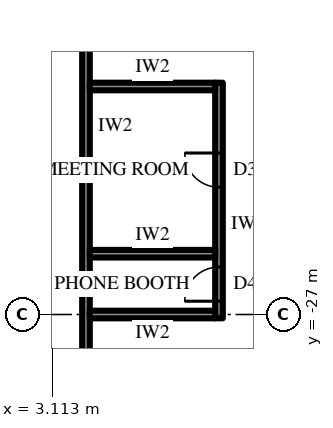
"""IFC4 building model, lengths in metres.
Left out: names, types, materials, properties, quantities, classifications, styles, units other than length and angle.
Written with IfcOpenShell. Run it as: python <this file> out.ifc"""

import sys

from ifc_helpers import new_model, si_unit, direction, frame, frame_2d, origin, place, context, subcontext, project, spatial, rectangle, extrude, element, fill, save


model = new_model("IFC4")
c1 = context("Model", 3, precision=1e-05, world=origin(), true_north=direction((0.0, 1.0)))
c2 = subcontext(c1, "Body", "Model", "MODEL_VIEW")
j1 = project(units=[si_unit("LENGTHUNIT", "METRE"), si_unit("PLANEANGLEUNIT", "RADIAN")], contexts=[c1])
p1 = place(None, origin())
s1 = spatial("IfcSite", under=j1, at=p1, CompositionType="ELEMENT")
p2 = place(p1, origin())
s2 = spatial("IfcBuilding", under=s1, at=p2, CompositionType="ELEMENT")
p3 = place(p2, frame((0.0, 0.0, 40.3)))
s3 = spatial("IfcBuildingStorey", under=s2, at=p3, CompositionType="ELEMENT", Elevation=40.3)
p4 = place(p3, frame((4.0, -14.2, 0.0), z_axis=(0.0, 0.0, 1.0), x_axis=(0.0, -1.0, 0.0)))
e1 = element("IfcWall", 1, at=p4, inside=s3, PredefinedType="PARTITIONING", context=c2, shape_type="SweptSolid", body=[
    extrude(rectangle(XDim=19.6, YDim=0.2, at=frame_2d((9.8, 0.0))), origin(), (0.0, 0.0, 1.0), 4.0),
])
p5 = place(p4, frame((1.46, 0.0, 0.0)))
e2 = element("IfcOpeningElement", 2, at=p5, cuts=e1, PredefinedType="OPENING", context=c2, shape_type="SweptSolid", body=[
    extrude(rectangle(XDim=1.0, YDim=2.2, at=frame_2d((0.5, 1.1))), frame((0.0, 0.11, 0.0), z_axis=(0.0, -1.0, 0.0), x_axis=(1.0, 0.0, 0.0)), (0.0, 0.0, 1.0), 0.22),
])
p6 = place(p3, frame((7.5, -20.9, 0.0), z_axis=(0.0, 0.0, 1.0), x_axis=(0.0, -1.0, 0.0)))
e3 = element("IfcWall", 3, at=p6, inside=s3, PredefinedType="PARTITIONING", context=c2, shape_type="SweptSolid", body=[
    extrude(rectangle(XDim=6.2, YDim=0.2, at=frame_2d((3.1, 0.0))), origin(), (0.0, 0.0, 1.0), 4.0),
])
p7 = place(p6, frame((1.85, 0.0, 0.0)))
e4 = element("IfcOpeningElement", 4, at=p7, cuts=e3, PredefinedType="OPENING", context=c2, shape_type="SweptSolid", body=[
    extrude(rectangle(XDim=0.9, YDim=2.2, at=frame_2d((0.45, 1.1))), frame((0.0, 0.11, 0.0), z_axis=(0.0, -1.0, 0.0), x_axis=(1.0, 0.0, 0.0)), (0.0, 0.0, 1.0), 0.22),
])
p8 = place(p6, frame((4.85, 0.0, 0.0)))
e5 = element("IfcOpeningElement", 5, at=p8, cuts=e3, PredefinedType="OPENING", context=c2, shape_type="SweptSolid", body=[
    extrude(rectangle(XDim=0.9, YDim=2.2, at=frame_2d((0.45, 1.1))), frame((0.0, 0.11, 0.0), z_axis=(0.0, -1.0, 0.0), x_axis=(1.0, 0.0, 0.0)), (0.0, 0.0, 1.0), 0.22),
])
for number, where, z_axis, x_axis in (
    (6, (4.1, -21.0, 0.0), (0.0, 0.0, 1.0), (1.0, 0.0, 0.0)),
    (7, (4.1, -25.4, 0.0), (0.0, 0.0, 1.0), (1.0, 0.0, 0.0)),
    (8, (4.1, -27.0, 0.0), (0.0, 0.0, 1.0), (1.0, 0.0, 0.0)),
):
    element("IfcWall", number, at=place(p3, frame(where, z_axis=z_axis, x_axis=x_axis)), inside=s3, PredefinedType="PARTITIONING", context=c2, shape_type="SweptSolid", body=[
        extrude(rectangle(XDim=3.3, YDim=0.2, at=frame_2d((1.65, 0.0))), origin(), (0.0, 0.0, 1.0), 4.0),
    ])
p9 = place(p7, frame((0.9, 0.0, 0.0), z_axis=(0.0, 0.0, 1.0), x_axis=(-1.0, 0.0, 0.0)))
e9 = element("IfcDoor", 9, at=p9, inside=s3, OperationType="SINGLE_SWING_LEFT", PredefinedType="DOOR", context=c2, shape_type="SweptSolid", body=[
    extrude(rectangle(XDim=0.9, YDim=2.2, at=frame_2d((0.45, 1.1))), frame((0.0, 0.025, 0.0), z_axis=(0.0, -1.0, 0.0), x_axis=(1.0, 0.0, 0.0)), (0.0, 0.0, 1.0), 0.05),
])
fill(e4, e9)
p10 = place(p8, frame((0.9, 0.0, 0.0), z_axis=(0.0, 0.0, 1.0), x_axis=(-1.0, 0.0, 0.0)))
e10 = element("IfcDoor", 10, at=p10, inside=s3, OperationType="SINGLE_SWING_RIGHT", PredefinedType="DOOR", context=c2, shape_type="SweptSolid", body=[
    extrude(rectangle(XDim=0.9, YDim=2.2, at=frame_2d((0.45, 1.1))), frame((0.0, 0.025, 0.0), z_axis=(0.0, -1.0, 0.0), x_axis=(1.0, 0.0, 0.0)), (0.0, 0.0, 1.0), 0.05),
])
fill(e5, e10)
save(model, sys.argv[1])
